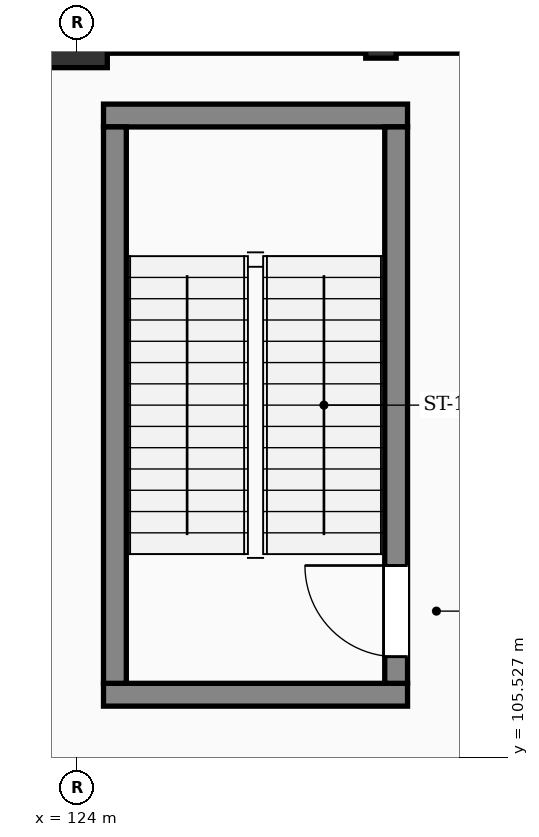
"""IFC4 building model, lengths in metres.
Left out: names, types, materials, properties, quantities, classifications, styles, units other than length and angle.
Written with IfcOpenShell. Run it as: python <this file> out.ifc"""

import sys

from ifc_helpers import new_model, si_unit, direction, frame, frame_2d, origin, origin_2d, place, context, subcontext, project, spatial, rectangle, extrude, element, fill, save


model = new_model("IFC4")
c1 = context("Model", 3, precision=1e-05, world=origin(), true_north=direction((0.0, 1.0)))
c2 = subcontext(c1, "Body", "Model", "MODEL_VIEW")
j1 = project(units=[si_unit("LENGTHUNIT", "METRE"), si_unit("PLANEANGLEUNIT", "RADIAN")], contexts=[c1])
p1 = place(None, origin())
s1 = spatial("IfcSite", under=j1, at=p1, CompositionType="ELEMENT")
p2 = place(p1, origin())
s2 = spatial("IfcBuilding", under=s1, at=p2, CompositionType="ELEMENT")
p3 = place(p2, frame((0.0, 0.0, -4.8)))
s3 = spatial("IfcBuildingStorey", under=s2, at=p3, CompositionType="ELEMENT", Elevation=-4.8)
p4 = place(p3, frame((124.0, 115.0, -0.38), z_axis=(0.0, 0.0, 1.0), x_axis=(1.0, 0.0, 0.0)))
e1 = element("IfcColumn", 1, at=p4, inside=s3, PredefinedType="COLUMN", context=c2, shape_type="SweptSolid", body=[
    extrude(rectangle(XDim=0.8, YDim=0.8, at=origin_2d()), origin(), (0.0, 0.0, 1.0), 5.18),
])
p5 = place(p3, frame((128.0, 115.0, -0.38), z_axis=(0.0, 0.0, 1.0), x_axis=(1.0, 0.0, 0.0)))
e2 = element("IfcColumn", 2, at=p5, inside=s3, PredefinedType="PILASTER", context=c2, shape_type="SweptSolid", body=[
    extrude(rectangle(XDim=0.4, YDim=0.55, at=origin_2d()), origin(), (0.0, 0.0, 1.0), 5.18),
])
p6 = place(p3, frame((124.4, 115.0, 0.0), z_axis=(0.0, 0.0, 1.0), x_axis=(1.0, 0.0, 0.0)))
e3 = element("IfcWall", 3, at=p6, inside=s3, PredefinedType="USERDEFINED", context=c2, shape_type="SweptSolid", body=[
    extrude(rectangle(XDim=3.4, YDim=0.42, at=frame_2d((1.7, 0.0))), origin(), (0.0, 0.0, 1.0), 3.85),
])
p7 = place(p3, frame((128.2, 115.0, 0.0), z_axis=(0.0, 0.0, 1.0), x_axis=(1.0, 0.0, 0.0)))
e4 = element("IfcWall", 4, at=p7, inside=s3, PredefinedType="USERDEFINED", context=c2, shape_type="SweptSolid", body=[
    extrude(rectangle(XDim=3.5, YDim=0.42, at=frame_2d((1.75, 0.0))), origin(), (0.0, 0.0, 1.0), 3.85),
])
for number, where, z_axis, x_axis in (
    (5, (124.35, 106.35, -0.38), (0.0, 0.0, 1.0), (1.0, 0.0, 0.0)),
    (6, (128.35, 113.97, -0.38), (0.0, 0.0, 1.0), (-1.0, 0.0, 0.0)),
):
    element("IfcWall", number, at=place(p3, frame(where, z_axis=z_axis, x_axis=x_axis)), inside=s3, PredefinedType="SHEAR", context=c2, shape_type="SweptSolid", body=[
        extrude(rectangle(XDim=4.0, YDim=0.3, at=frame_2d((2.0, 0.0))), origin(), (0.0, 0.0, 1.0), 4.88),
    ])
p8 = place(p3, frame((124.5, 106.5, -0.38), z_axis=(0.0, 0.0, 1.0), x_axis=(0.0, 1.0, 0.0)))
e7 = element("IfcWall", 7, at=p8, inside=s3, PredefinedType="SHEAR", context=c2, shape_type="SweptSolid", body=[
    extrude(rectangle(XDim=7.32, YDim=0.3, at=frame_2d((3.66, 0.0))), origin(), (0.0, 0.0, 1.0), 4.88),
])
p9 = place(p3, frame((128.2, 106.5, -0.38), z_axis=(0.0, 0.0, 1.0), x_axis=(0.0, 1.0, 0.0)))
e8 = element("IfcWall", 8, at=p9, inside=s3, PredefinedType="SHEAR", context=c2, shape_type="SweptSolid", body=[
    extrude(rectangle(XDim=7.32, YDim=0.3, at=frame_2d((3.66, 0.0))), origin(), (0.0, 0.0, 1.0), 4.88),
])
p10 = place(p9, frame((0.35, 0.0, 0.38)))
e9 = element("IfcOpeningElement", 9, at=p10, cuts=e8, PredefinedType="OPENING", context=c2, shape_type="SweptSolid", body=[
    extrude(rectangle(XDim=1.2, YDim=2.15, at=frame_2d((0.6, 1.075))), frame((0.0, 0.16, 0.0), z_axis=(0.0, -1.0, 0.0), x_axis=(1.0, 0.0, 0.0)), (0.0, 0.0, 1.0), 0.32),
])
p11 = place(p10, origin())
e10 = element("IfcDoor", 10, at=p11, inside=s3, OperationType="SINGLE_SWING_RIGHT", PredefinedType="DOOR", context=c2, shape_type="SweptSolid", body=[
    extrude(rectangle(XDim=1.2, YDim=2.15, at=frame_2d((0.6, 1.075))), frame((0.0, 0.025, 0.0), z_axis=(0.0, -1.0, 0.0), x_axis=(1.0, 0.0, 0.0)), (0.0, 0.0, 1.0), 0.05),
])
fill(e9, e10)
save(model, sys.argv[1])
